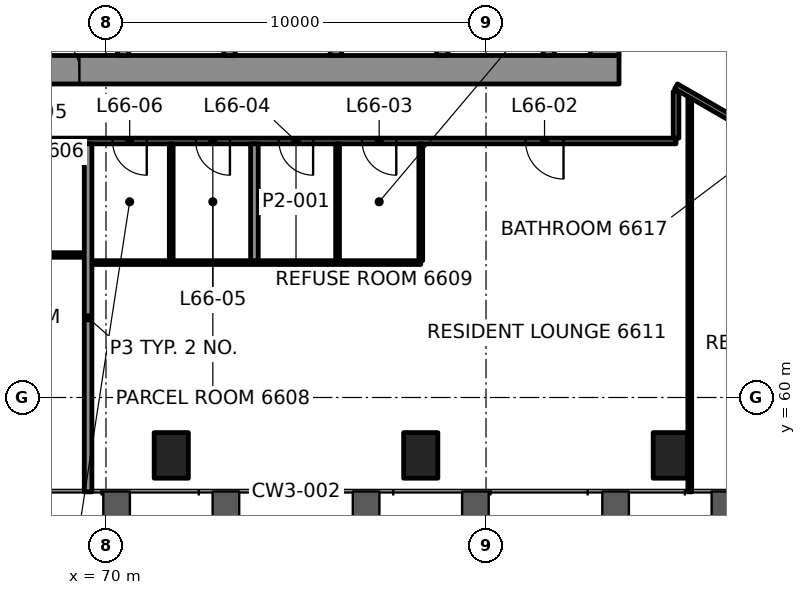
"""IFC4 building model, lengths in metres.
Left out: names, types, materials, properties, quantities, classifications, styles, units other than length and angle.
Written with IfcOpenShell. Run it as: python <this file> out.ifc"""

import sys

from ifc_helpers import new_model, si_unit, direction, frame, frame_2d, origin, origin_2d, place, context, subcontext, project, spatial, rectangle, hollow_rectangle, extrude, element, fill, save


model = new_model("IFC4")
c1 = context("Model", 3, precision=1e-05, world=origin(), true_north=direction((0.0, 1.0)))
c2 = subcontext(c1, "Body", "Model", "MODEL_VIEW")
j1 = project(units=[si_unit("LENGTHUNIT", "METRE"), si_unit("PLANEANGLEUNIT", "RADIAN")], contexts=[c1])
p1 = place(None, origin())
s1 = spatial("IfcSite", under=j1, at=p1, CompositionType="ELEMENT")
p2 = place(p1, origin())
s2 = spatial("IfcBuilding", under=s1, at=p2, CompositionType="ELEMENT")
p3 = place(p2, frame((0.0, 0.0, 277.6)))
s3 = spatial("IfcBuildingStorey", under=s2, at=p3, CompositionType="ELEMENT", Elevation=277.6)
for number, where, z_axis, x_axis in (
    (1, (71.717, 58.476, -0.0), (0.0, 0.0, 1.0), (1.0, 0.0, 0.0)),
    (2, (78.283, 58.476, -0.0), (0.0, 0.0, 1.0), (1.0, 0.0, 0.0)),
    (3, (84.848, 58.476, -0.0), (0.0, 0.0, 1.0), (1.0, 0.0, 0.0)),
):
    element("IfcColumn", number, at=place(p3, frame(where, z_axis=z_axis, x_axis=x_axis)), inside=s3, PredefinedType="COLUMN", context=c2, shape_type="SweptSolid", body=[
        extrude(hollow_rectangle(XDim=0.9, YDim=1.2, WallThickness=0.06, at=origin_2d()), origin(), (0.0, 0.0, 1.0), 3.5),
    ])
p4 = place(p3, frame((66.5, 68.625, 0.0), z_axis=(0.0, 0.0, 1.0), x_axis=(1.0, 0.0, 0.0)))
e4 = element("IfcWall", 4, at=p4, inside=s3, PredefinedType="SHEAR", context=c2, shape_type="SweptSolid", body=[
    extrude(rectangle(XDim=17.0, YDim=0.75, at=frame_2d((8.5, 0.0))), origin(), (0.0, 0.0, 1.0), 3.3),
])
p5 = place(p4, frame((1.9, 0.0, 0.0)))
e5 = element("IfcOpeningElement", 5, at=p5, cuts=e4, PredefinedType="OPENING", context=c2, shape_type="SweptSolid", body=[
    extrude(rectangle(XDim=0.9, YDim=2.1, at=frame_2d((0.45, 1.05))), frame((0.0, 0.385, 0.0), z_axis=(0.0, -1.0, 0.0), x_axis=(1.0, 0.0, 0.0)), (0.0, 0.0, 1.0), 0.77),
])
p6 = place(p3, frame((83.125, 69.0, 0.0), z_axis=(0.0, 0.0, 1.0), x_axis=(0.0, 1.0, 0.0)))
e6 = element("IfcWall", 6, at=p6, inside=s3, PredefinedType="SHEAR", context=c2, shape_type="SweptSolid", body=[
    extrude(rectangle(XDim=12.0, YDim=0.75, at=frame_2d((6.0, 0.0))), origin(), (0.0, 0.0, 1.0), 3.3),
])
p7 = place(p6, frame((3.4, 0.0, 0.0)))
e7 = element("IfcOpeningElement", 7, at=p7, cuts=e6, PredefinedType="OPENING", context=c2, shape_type="SweptSolid", body=[
    extrude(rectangle(XDim=1.8, YDim=2.1, at=frame_2d((0.9, 1.05))), frame((0.0, 0.385, 0.0), z_axis=(0.0, -1.0, 0.0), x_axis=(1.0, 0.0, 0.0)), (0.0, 0.0, 1.0), 0.77),
])
for number, where, z_axis, x_axis in (
    (8, (70.45, 69.0, 0.0), (0.0, 0.0, 1.0), (0.0, 1.0, 0.0)),
    (9, (73.25, 69.0, 0.0), (0.0, 0.0, 1.0), (0.0, 1.0, 0.0)),
    (10, (76.05, 69.0, 0.0), (0.0, 0.0, 1.0), (0.0, 1.0, 0.0)),
    (11, (78.85, 69.0, 0.0), (0.0, 0.0, 1.0), (0.0, 1.0, 0.0)),
    (12, (81.65, 69.0, 0.0), (0.0, 0.0, 1.0), (0.0, 1.0, 0.0)),
):
    element("IfcWall", number, at=place(p3, frame(where, z_axis=z_axis, x_axis=x_axis)), inside=s3, PredefinedType="SHEAR", context=c2, shape_type="SweptSolid", body=[
        extrude(rectangle(XDim=2.6, YDim=0.3, at=frame_2d((1.3, 0.0))), origin(), (0.0, 0.0, 1.0), 3.3),
    ])
p8 = place(p3, frame((69.629, 63.55, 0.0), z_axis=(0.0, 0.0, 1.0), x_axis=(1.0, 0.0, 0.0)))
e13 = element("IfcWall", 13, at=p8, inside=s3, PredefinedType="PARTITIONING", context=c2, shape_type="SweptSolid", body=[
    extrude(rectangle(XDim=8.653, YDim=0.1, at=frame_2d((4.326, 0.0))), origin(), (0.0, 0.0, 1.0), 2.7),
])
p9 = place(p3, frame((63.434, 63.75, 0.0), z_axis=(0.0, 0.0, 1.0), x_axis=(1.0, 0.0, 0.0)))
e14 = element("IfcWall", 14, at=p9, inside=s3, PredefinedType="PARTITIONING", context=c2, shape_type="SweptSolid", body=[
    extrude(rectangle(XDim=5.995, YDim=0.12, at=frame_2d((2.997, 0.0))), origin(), (0.0, 0.0, 1.0), 2.7),
])
p10 = place(p9, frame((3.199, 0.0, 0.0)))
e15 = element("IfcOpeningElement", 15, at=p10, cuts=e14, PredefinedType="OPENING", context=c2, shape_type="SweptSolid", body=[
    extrude(rectangle(XDim=0.9, YDim=2.1, at=frame_2d((0.45, 1.05))), frame((0.0, 0.07, 0.0), z_axis=(0.0, -1.0, 0.0), x_axis=(1.0, 0.0, 0.0)), (0.0, 0.0, 1.0), 0.14),
])
p11 = place(p3, frame((85.0, 66.75, 0.0), z_axis=(0.0, 0.0, 1.0), x_axis=(-1.0, 0.0, 0.0)))
e16 = element("IfcWall", 16, at=p11, inside=s3, PredefinedType="PARTITIONING", context=c2, shape_type="SweptSolid", body=[
    extrude(rectangle(XDim=19.999, YDim=0.15, at=frame_2d((10.0, 0.0))), origin(), (0.0, 0.0, 1.0), 2.7),
])
p12 = place(p11, frame((2.96, 0.0, 0.0)))
e17 = element("IfcOpeningElement", 17, at=p12, cuts=e16, PredefinedType="OPENING", context=c2, shape_type="SweptSolid", body=[
    extrude(rectangle(XDim=1.0, YDim=2.1, at=frame_2d((0.5, 1.05))), frame((0.0, 0.085, 0.0), z_axis=(0.0, -1.0, 0.0), x_axis=(1.0, 0.0, 0.0)), (0.0, 0.0, 1.0), 0.17),
])
p13 = place(p11, frame((7.361, 0.0, 0.0)))
e18 = element("IfcOpeningElement", 18, at=p13, cuts=e16, PredefinedType="OPENING", context=c2, shape_type="SweptSolid", body=[
    extrude(rectangle(XDim=0.9, YDim=2.1, at=frame_2d((0.45, 1.05))), frame((0.0, 0.085, 0.0), z_axis=(0.0, -1.0, 0.0), x_axis=(1.0, 0.0, 0.0)), (0.0, 0.0, 1.0), 0.17),
])
p14 = place(p11, frame((9.55, 0.0, 0.0)))
e19 = element("IfcOpeningElement", 19, at=p14, cuts=e16, PredefinedType="OPENING", context=c2, shape_type="SweptSolid", body=[
    extrude(rectangle(XDim=0.9, YDim=2.1, at=frame_2d((0.45, 1.05))), frame((0.0, 0.085, 0.0), z_axis=(0.0, -1.0, 0.0), x_axis=(1.0, 0.0, 0.0)), (0.0, 0.0, 1.0), 0.17),
])
p15 = place(p11, frame((11.738, 0.0, 0.0)))
e20 = element("IfcOpeningElement", 20, at=p15, cuts=e16, PredefinedType="OPENING", context=c2, shape_type="SweptSolid", body=[
    extrude(rectangle(XDim=0.9, YDim=2.1, at=frame_2d((0.45, 1.05))), frame((0.0, 0.085, 0.0), z_axis=(0.0, -1.0, 0.0), x_axis=(1.0, 0.0, 0.0)), (0.0, 0.0, 1.0), 0.17),
])
p16 = place(p11, frame((13.926, 0.0, 0.0)))
e21 = element("IfcOpeningElement", 21, at=p16, cuts=e16, PredefinedType="OPENING", context=c2, shape_type="SweptSolid", body=[
    extrude(rectangle(XDim=0.9, YDim=2.1, at=frame_2d((0.45, 1.05))), frame((0.0, 0.085, 0.0), z_axis=(0.0, -1.0, 0.0), x_axis=(1.0, 0.0, 0.0)), (0.0, 0.0, 1.0), 0.17),
])
p17 = place(p3, frame((85.361, 57.516, 0.0), z_axis=(0.0, 0.0, 1.0), x_axis=(0.0, 1.0, 0.0)))
e22 = element("IfcWall", 22, at=p17, inside=s3, PredefinedType="PARTITIONING", context=c2, shape_type="SweptSolid", body=[
    extrude(rectangle(XDim=10.346, YDim=0.1, at=frame_2d((5.173, 0.0))), origin(), (0.0, 0.0, 1.0), 2.547),
])
p18 = place(p3, frame((85.0, 66.825, 0.0), z_axis=(0.0, 0.0, 1.0), x_axis=(0.0, 1.0, 0.0)))
e23 = element("IfcWall", 23, at=p18, inside=s3, PredefinedType="PARTITIONING", context=c2, shape_type="SweptSolid", body=[
    extrude(rectangle(XDim=1.225, YDim=0.15, at=frame_2d((0.613, 0.0))), origin(), (0.0, 0.0, 1.0), 2.547),
])
p19 = place(p3, frame((78.283, 63.601, 0.0), z_axis=(0.0, 0.0, 1.0), x_axis=(0.0, 1.0, 0.0)))
e24 = element("IfcWall", 24, at=p19, inside=s3, PredefinedType="PARTITIONING", context=c2, shape_type="SweptSolid", body=[
    extrude(rectangle(XDim=3.074, YDim=0.1, at=frame_2d((1.537, 0.0))), origin(), (0.0, 0.0, 1.0), 2.7),
])
p20 = place(p3, frame((76.094, 63.6, 0.0), z_axis=(0.0, 0.0, 1.0), x_axis=(0.0, 1.0, 0.0)))
e25 = element("IfcWall", 25, at=p20, inside=s3, PredefinedType="PARTITIONING", context=c2, shape_type="SweptSolid", body=[
    extrude(rectangle(XDim=3.075, YDim=0.1, at=frame_2d((1.538, 0.0))), origin(), (0.0, 0.0, 1.0), 2.7),
])
p21 = place(p3, frame((73.906, 63.6, 0.0), z_axis=(0.0, 0.0, 1.0), x_axis=(0.0, 1.0, 0.0)))
e26 = element("IfcWall", 26, at=p21, inside=s3, PredefinedType="PARTITIONING", context=c2, shape_type="SweptSolid", body=[
    extrude(rectangle(XDim=3.075, YDim=0.2, at=frame_2d((1.538, 0.0))), origin(), (0.0, 0.0, 1.0), 2.7),
])
p22 = place(p3, frame((71.717, 63.6, 0.0), z_axis=(0.0, 0.0, 1.0), x_axis=(0.0, 1.0, 0.0)))
e27 = element("IfcWall", 27, at=p22, inside=s3, PredefinedType="PARTITIONING", context=c2, shape_type="SweptSolid", body=[
    extrude(rectangle(XDim=3.075, YDim=0.1, at=frame_2d((1.538, 0.0))), origin(), (0.0, 0.0, 1.0), 2.7),
])
p23 = place(p3, frame((69.529, 57.516, 0.0), z_axis=(0.0, 0.0, 1.0), x_axis=(0.0, 1.0, 0.0)))
e28 = element("IfcWall", 28, at=p23, inside=s3, PredefinedType="PARTITIONING", context=c2, shape_type="SweptSolid", body=[
    extrude(rectangle(XDim=9.159, YDim=0.2, at=frame_2d((4.579, 0.0))), origin(), (0.0, 0.0, 1.0), 2.688),
])
p24 = place(p3, frame((85.0, 70.266, 0.0), z_axis=(0.0, 0.0, 1.0), x_axis=(0.866026970734, -0.499997285954, 0.0)))
e29 = element("IfcWall", 29, at=p24, inside=s3, PredefinedType="PARTITIONING", context=c2, shape_type="SweptSolid", body=[
    extrude(rectangle(XDim=14.584, YDim=0.15, at=frame_2d((7.292, 0.0))), origin(), (0.0, 0.0, 1.0), 2.7),
])
p25 = place(p24, frame((10.094, 0.0, 0.0)))
e30 = element("IfcOpeningElement", 30, at=p25, cuts=e29, PredefinedType="OPENING", context=c2, shape_type="SweptSolid", body=[
    extrude(rectangle(XDim=1.0, YDim=2.1, at=frame_2d((0.5, 1.05))), frame((0.0, 0.085, 0.0), z_axis=(0.0, -1.0, 0.0), x_axis=(1.0, 0.0, 0.0)), (0.0, 0.0, 1.0), 0.17),
])
p26 = place(p3, frame((96.73, 61.415, 0.0), z_axis=(0.0, 0.0, 1.0), x_axis=(-0.866032805753, 0.499987179195, 0.0)))
e31 = element("IfcWall", 31, at=p26, inside=s3, PredefinedType="PARTITIONING", context=c2, shape_type="SweptSolid", body=[
    extrude(rectangle(XDim=13.545, YDim=0.15, at=frame_2d((6.772, 0.0))), origin(), (0.0, 0.0, 1.0), 2.547),
])
p27 = place(p26, frame((2.078, 0.0, 0.0)))
e32 = element("IfcOpeningElement", 32, at=p27, cuts=e31, PredefinedType="OPENING", context=c2, shape_type="SweptSolid", body=[
    extrude(rectangle(XDim=1.0, YDim=2.1, at=frame_2d((0.5, 1.05))), frame((0.0, 0.085, 0.0), z_axis=(0.0, -1.0, 0.0), x_axis=(1.0, 0.0, 0.0)), (0.0, 0.0, 1.0), 0.17),
])
p28 = place(p26, frame((8.54, 0.0, 0.0)))
e33 = element("IfcOpeningElement", 33, at=p28, cuts=e31, PredefinedType="OPENING", context=c2, shape_type="SweptSolid", body=[
    extrude(rectangle(XDim=1.0, YDim=2.1, at=frame_2d((0.5, 1.05))), frame((0.0, 0.085, 0.0), z_axis=(0.0, -1.0, 0.0), x_axis=(1.0, 0.0, 0.0)), (0.0, 0.0, 1.0), 0.17),
])
p29 = place(p12, origin())
e34 = element("IfcDoor", 34, at=p29, inside=s3, OperationType="SINGLE_SWING_LEFT", PredefinedType="DOOR", context=c2, shape_type="SweptSolid", body=[
    extrude(rectangle(XDim=1.0, YDim=2.1, at=frame_2d((0.5, 1.05))), frame((0.0, 0.025, 0.0), z_axis=(0.0, -1.0, 0.0), x_axis=(1.0, 0.0, 0.0)), (0.0, 0.0, 1.0), 0.05),
])
fill(e17, e34)
p30 = place(p13, origin())
e35 = element("IfcDoor", 35, at=p30, inside=s3, OperationType="SINGLE_SWING_RIGHT", PredefinedType="DOOR", context=c2, shape_type="SweptSolid", body=[
    extrude(rectangle(XDim=0.9, YDim=2.1, at=frame_2d((0.45, 1.05))), frame((0.0, 0.025, 0.0), z_axis=(0.0, -1.0, 0.0), x_axis=(1.0, 0.0, 0.0)), (0.0, 0.0, 1.0), 0.05),
])
fill(e18, e35)
p31 = place(p14, origin())
e36 = element("IfcDoor", 36, at=p31, inside=s3, OperationType="SINGLE_SWING_LEFT", PredefinedType="DOOR", context=c2, shape_type="SweptSolid", body=[
    extrude(rectangle(XDim=0.9, YDim=2.1, at=frame_2d((0.45, 1.05))), frame((0.0, 0.025, 0.0), z_axis=(0.0, -1.0, 0.0), x_axis=(1.0, 0.0, 0.0)), (0.0, 0.0, 1.0), 0.05),
])
fill(e19, e36)
p32 = place(p15, origin())
e37 = element("IfcDoor", 37, at=p32, inside=s3, OperationType="SINGLE_SWING_RIGHT", PredefinedType="DOOR", context=c2, shape_type="SweptSolid", body=[
    extrude(rectangle(XDim=0.9, YDim=2.1, at=frame_2d((0.45, 1.05))), frame((0.0, 0.025, 0.0), z_axis=(0.0, -1.0, 0.0), x_axis=(1.0, 0.0, 0.0)), (0.0, 0.0, 1.0), 0.05),
])
fill(e20, e37)
p33 = place(p16, origin())
e38 = element("IfcDoor", 38, at=p33, inside=s3, OperationType="SINGLE_SWING_LEFT", PredefinedType="DOOR", context=c2, shape_type="SweptSolid", body=[
    extrude(rectangle(XDim=0.9, YDim=2.1, at=frame_2d((0.45, 1.05))), frame((0.0, 0.025, 0.0), z_axis=(0.0, -1.0, 0.0), x_axis=(1.0, 0.0, 0.0)), (0.0, 0.0, 1.0), 0.05),
])
fill(e21, e38)
p34 = place(p5, origin())
e39 = element("IfcDoor", 39, at=p34, inside=s3, OperationType="SINGLE_SWING_RIGHT", PredefinedType="DOOR", context=c2, shape_type="SweptSolid", body=[
    extrude(rectangle(XDim=0.9, YDim=2.1, at=frame_2d((0.45, 1.05))), frame((0.0, 0.095, 0.0), z_axis=(0.0, -1.0, 0.0), x_axis=(1.0, 0.0, 0.0)), (0.0, 0.0, 1.0), 0.19),
])
fill(e5, e39)
save(model, sys.argv[1])
